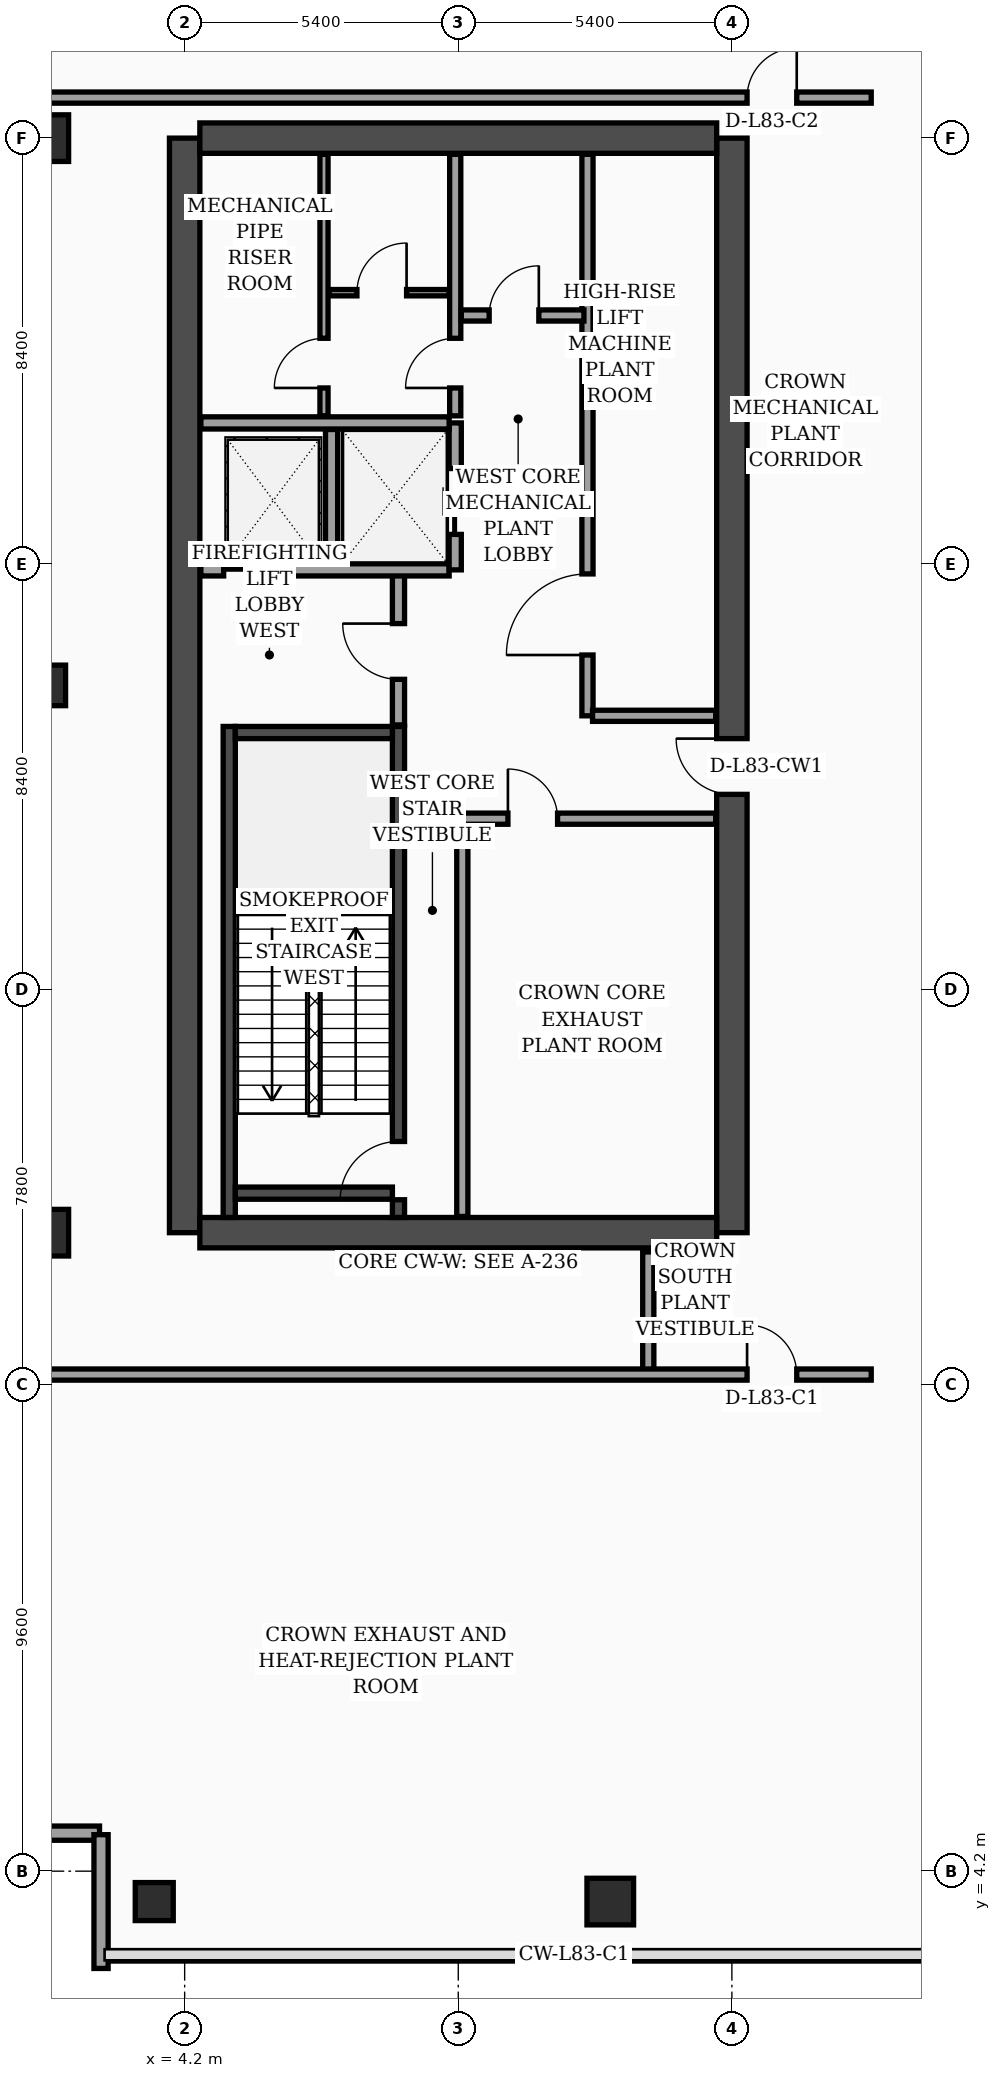
"""IFC4 building model, lengths in metres.
Left out: names, types, materials, properties, quantities, classifications, styles, units other than length and angle.
Written with IfcOpenShell. Run it as: python <this file> out.ifc"""

import sys

from ifc_helpers import new_model, si_unit, direction, frame, frame_2d, origin, origin_2d, place, context, subcontext, project, spatial, rectangle, hollow_rectangle, extrude, element, fill, save


model = new_model("IFC4")
c1 = context("Model", 3, precision=1e-05, world=origin(), true_north=direction((0.0, 1.0)))
c2 = subcontext(c1, "Body", "Model", "MODEL_VIEW")
j1 = project(units=[si_unit("LENGTHUNIT", "METRE"), si_unit("PLANEANGLEUNIT", "RADIAN")], contexts=[c1])
p1 = place(None, origin())
s1 = spatial("IfcSite", under=j1, at=p1, CompositionType="ELEMENT")
p2 = place(p1, origin())
s2 = spatial("IfcBuilding", under=s1, at=p2, CompositionType="ELEMENT")
p3 = place(p2, frame((0.0, 0.0, 340.5)))
s3 = spatial("IfcBuildingStorey", under=s2, at=p3, CompositionType="ELEMENT", Elevation=340.5)
p4 = place(p3, frame((4.2, 16.8, 0.0), z_axis=(0.0, 0.0, 1.0), x_axis=(0.0, 1.0, 0.0)))
e1 = element("IfcWall", 1, at=p4, inside=s3, PredefinedType="SHEAR", context=c2, shape_type="SweptSolid", body=[
    extrude(rectangle(XDim=21.6, YDim=0.6, at=frame_2d((10.8, 0.0))), origin(), (0.0, 0.0, 1.0), 4.76),
])
p5 = place(p3, frame((15.0, 16.8, 0.0), z_axis=(0.0, 0.0, 1.0), x_axis=(0.0, 1.0, 0.0)))
e2 = element("IfcWall", 2, at=p5, inside=s3, PredefinedType="SHEAR", context=c2, shape_type="SweptSolid", body=[
    extrude(rectangle(XDim=21.6, YDim=0.6, at=frame_2d((10.8, 0.0))), origin(), (0.0, 0.0, 1.0), 4.76),
])
p6 = place(p5, frame((8.65, 0.0, 0.0)))
e3 = element("IfcOpeningElement", 3, at=p6, cuts=e2, PredefinedType="OPENING", context=c2, shape_type="SweptSolid", body=[
    extrude(rectangle(XDim=1.1, YDim=2.2, at=frame_2d((0.55, 1.1))), frame((0.0, 0.31, 0.0), z_axis=(0.0, -1.0, 0.0), x_axis=(1.0, 0.0, 0.0)), (0.0, 0.0, 1.0), 0.62),
])
for number, where, z_axis, x_axis in (
    (4, (4.5, 38.4, 0.0), (0.0, 0.0, 1.0), (1.0, 0.0, 0.0)),
    (5, (4.5, 16.8, 0.0), (0.0, 0.0, 1.0), (1.0, 0.0, 0.0)),
):
    element("IfcWall", number, at=place(p3, frame(where, z_axis=z_axis, x_axis=x_axis)), inside=s3, PredefinedType="SHEAR", context=c2, shape_type="SweptSolid", body=[
        extrude(rectangle(XDim=10.2, YDim=0.6, at=frame_2d((5.1, 0.0))), origin(), (0.0, 0.0, 1.0), 4.76),
    ])
p7 = place(p3, frame((5.08, 17.1, 0.0), z_axis=(0.0, 0.0, 1.0), x_axis=(0.0, 1.0, 0.0)))
e6 = element("IfcWall", 6, at=p7, inside=s3, PredefinedType="SOLIDWALL", context=c2, shape_type="SweptSolid", body=[
    extrude(rectangle(XDim=9.69, YDim=0.24, at=frame_2d((4.845, 0.0))), origin(), (0.0, 0.0, 1.0), 4.76),
])
p8 = place(p3, frame((8.42, 17.1, 0.0), z_axis=(0.0, 0.0, 1.0), x_axis=(0.0, 1.0, 0.0)))
e7 = element("IfcWall", 7, at=p8, inside=s3, PredefinedType="SOLIDWALL", context=c2, shape_type="SweptSolid", body=[
    extrude(rectangle(XDim=9.69, YDim=0.24, at=frame_2d((4.845, 0.0))), origin(), (0.0, 0.0, 1.0), 4.76),
])
p9 = place(p8, frame((0.35, 0.0, 0.0)))
e8 = element("IfcOpeningElement", 8, at=p9, cuts=e7, PredefinedType="OPENING", context=c2, shape_type="SweptSolid", body=[
    extrude(rectangle(XDim=1.15, YDim=2.2, at=frame_2d((0.575, 1.1))), frame((0.0, 0.13, 0.0), z_axis=(0.0, -1.0, 0.0), x_axis=(1.0, 0.0, 0.0)), (0.0, 0.0, 1.0), 0.26),
])
for number, where, z_axis, x_axis in (
    (9, (5.2, 17.58, 0.0), (0.0, 0.0, 1.0), (1.0, 0.0, 0.0)),
    (10, (5.2, 26.67, 0.0), (0.0, 0.0, 1.0), (1.0, 0.0, 0.0)),
):
    element("IfcWall", number, at=place(p3, frame(where, z_axis=z_axis, x_axis=x_axis)), inside=s3, PredefinedType="SOLIDWALL", context=c2, shape_type="SweptSolid", body=[
        extrude(rectangle(XDim=3.1, YDim=0.24, at=frame_2d((1.55, 0.0))), origin(), (0.0, 0.0, 1.0), 4.76),
    ])
p10 = place(p3, frame((3.6, 3.6, 0.0), z_axis=(0.0, 0.0, 1.0), x_axis=(1.0, 0.0, 0.0)))
e11 = element("IfcColumn", 11, at=p10, inside=s3, PredefinedType="COLUMN", context=c2, shape_type="SweptSolid", body=[
    extrude(hollow_rectangle(XDim=0.75, YDim=0.75, WallThickness=0.032, at=origin_2d()), origin(), (0.0, 0.0, 1.0), 4.76),
])
p11 = place(p3, frame((1.45, 16.8, 0.0), z_axis=(0.0, 0.0, 1.0), x_axis=(1.0, 0.0, 0.0)))
e12 = element("IfcColumn", 12, at=p11, inside=s3, PredefinedType="COLUMN", context=c2, shape_type="SweptSolid", body=[
    extrude(rectangle(XDim=0.92, YDim=0.92, at=origin_2d()), origin(), (0.0, 0.0, 1.0), 4.76),
])
p12 = place(p3, frame((1.45, 27.6, 0.0), z_axis=(0.0, 0.0, 1.0), x_axis=(1.0, 0.0, 0.0)))
e13 = element("IfcColumn", 13, at=p12, inside=s3, PredefinedType="COLUMN", context=c2, shape_type="SweptSolid", body=[
    extrude(rectangle(XDim=0.8, YDim=0.8, at=origin_2d()), origin(), (0.0, 0.0, 1.0), 4.76),
])
for number, where, z_axis, x_axis in (
    (14, (1.45, 38.4, 0.0), (0.0, 0.0, 1.0), (1.0, 0.0, 0.0)),
    (15, (12.6, 3.6, 0.0), (0.0, 0.0, 1.0), (1.0, 0.0, 0.0)),
):
    element("IfcColumn", number, at=place(p3, frame(where, z_axis=z_axis, x_axis=x_axis)), inside=s3, PredefinedType="COLUMN", context=c2, shape_type="SweptSolid", body=[
        extrude(rectangle(XDim=0.92, YDim=0.92, at=origin_2d()), origin(), (0.0, 0.0, 1.0), 4.76),
    ])
p13 = place(p3, frame((-0.12, 4.95, 0.0), z_axis=(0.0, 0.0, 1.0), x_axis=(1.0, 0.0, 0.0)))
e16 = element("IfcWall", 16, at=p13, inside=s3, PredefinedType="SOLIDWALL", context=c2, shape_type="SweptSolid", body=[
    extrude(rectangle(XDim=2.64, YDim=0.28, at=frame_2d((1.32, 0.0))), origin(), (0.0, 0.0, 1.0), 4.76),
])
p14 = place(p3, frame((2.55, 4.92, 0.0), z_axis=(0.0, 0.0, 1.0), x_axis=(0.0, -1.0, 0.0)))
e17 = element("IfcWall", 17, at=p14, inside=s3, PredefinedType="SOLIDWALL", context=c2, shape_type="SweptSolid", body=[
    extrude(rectangle(XDim=2.64, YDim=0.28, at=frame_2d((1.32, 0.0))), origin(), (0.0, 0.0, 1.0), 4.76),
])
p15 = place(p3, frame((8.42, 26.82, 0.0), z_axis=(0.0, 0.0, 1.0), x_axis=(0.0, 1.0, 0.0)))
e18 = element("IfcWall", 18, at=p15, inside=s3, PredefinedType="SOLIDWALL", context=c2, shape_type="SweptSolid", body=[
    extrude(rectangle(XDim=3.0, YDim=0.24, at=frame_2d((1.5, 0.0))), origin(), (0.0, 0.0, 1.0), 4.76),
])
p16 = place(p15, frame((0.9, 0.0, 0.0)))
e19 = element("IfcOpeningElement", 19, at=p16, cuts=e18, PredefinedType="OPENING", context=c2, shape_type="SweptSolid", body=[
    extrude(rectangle(XDim=1.1, YDim=2.2, at=frame_2d((0.55, 1.1))), frame((0.0, 0.13, 0.0), z_axis=(0.0, -1.0, 0.0), x_axis=(1.0, 0.0, 0.0)), (0.0, 0.0, 1.0), 0.26),
])
p17 = place(p3, frame((4.52, 29.88, 0.0), z_axis=(0.0, 0.0, 1.0), x_axis=(1.0, 0.0, 0.0)))
e20 = element("IfcWall", 20, at=p17, inside=s3, PredefinedType="SOLIDWALL", context=c2, shape_type="SweptSolid", body=[
    extrude(rectangle(XDim=4.9, YDim=0.24, at=frame_2d((2.45, 0.0))), origin(), (0.0, 0.0, 1.0), 4.76),
])
p18 = place(p17, frame((0.45, 0.0, 0.0)))
e21 = element("IfcOpeningElement", 21, at=p18, cuts=e20, PredefinedType="OPENING", context=c2, shape_type="SweptSolid", body=[
    extrude(rectangle(XDim=1.3, YDim=2.35, at=frame_2d((0.65, 1.175))), frame((0.0, 0.13, 0.0), z_axis=(0.0, -1.0, 0.0), x_axis=(1.0, 0.0, 0.0)), (0.0, 0.0, 1.0), 0.26),
])
p19 = place(p3, frame((7.1, 30.02, 0.0), z_axis=(0.0, 0.0, 1.0), x_axis=(0.0, 1.0, 0.0)))
e22 = element("IfcWall", 22, at=p19, inside=s3, PredefinedType="SOLIDWALL", context=c2, shape_type="SweptSolid", body=[
    extrude(rectangle(XDim=2.63, YDim=0.24, at=frame_2d((1.315, 0.0))), origin(), (0.0, 0.0, 1.0), 4.76),
])
p20 = place(p3, frame((9.54, 29.88, 0.0), z_axis=(0.0, 0.0, 1.0), x_axis=(0.0, 1.0, 0.0)))
e23 = element("IfcWall", 23, at=p20, inside=s3, PredefinedType="SOLIDWALL", context=c2, shape_type="SweptSolid", body=[
    extrude(rectangle(XDim=2.9, YDim=0.24, at=frame_2d((1.45, 0.0))), origin(), (0.0, 0.0, 1.0), 4.76),
])
p21 = place(p20, frame((0.7, 0.0, 0.0)))
e24 = element("IfcOpeningElement", 24, at=p21, cuts=e23, PredefinedType="OPENING", context=c2, shape_type="SweptSolid", body=[
    extrude(rectangle(XDim=1.3, YDim=2.35, at=frame_2d((0.65, 1.175))), frame((0.0, 0.13, 0.0), z_axis=(0.0, -1.0, 0.0), x_axis=(1.0, 0.0, 0.0)), (0.0, 0.0, 1.0), 0.26),
])
p22 = place(p3, frame((4.52, 32.78, 0.0), z_axis=(0.0, 0.0, 1.0), x_axis=(1.0, 0.0, 0.0)))
e25 = element("IfcWall", 25, at=p22, inside=s3, PredefinedType="SOLIDWALL", context=c2, shape_type="SweptSolid", body=[
    extrude(rectangle(XDim=4.9, YDim=0.24, at=frame_2d((2.45, 0.0))), origin(), (0.0, 0.0, 1.0), 4.76),
])
p23 = place(p3, frame((9.68, 17.12, 0.0), z_axis=(0.0, 0.0, 1.0), x_axis=(0.0, 1.0, 0.0)))
e26 = element("IfcWall", 26, at=p23, inside=s3, PredefinedType="SOLIDWALL", context=c2, shape_type="SweptSolid", body=[
    extrude(rectangle(XDim=7.88, YDim=0.22, at=frame_2d((3.94, 0.0))), origin(), (0.0, 0.0, 1.0), 4.76),
])
p24 = place(p3, frame((6.95, 32.92, 0.0), z_axis=(0.0, 0.0, 1.0), x_axis=(0.0, 1.0, 0.0)))
e27 = element("IfcWall", 27, at=p24, inside=s3, PredefinedType="PARTITIONING", context=c2, shape_type="SweptSolid", body=[
    extrude(rectangle(XDim=5.16, YDim=0.16, at=frame_2d((2.58, 0.0))), origin(), (0.0, 0.0, 1.0), 4.76),
])
p25 = place(p24, frame((0.55, 0.0, 0.0)))
e28 = element("IfcOpeningElement", 28, at=p25, cuts=e27, PredefinedType="OPENING", context=c2, shape_type="SweptSolid", body=[
    extrude(rectangle(XDim=0.98, YDim=2.15, at=frame_2d((0.49, 1.075))), frame((0.0, 0.09, 0.0), z_axis=(0.0, -1.0, 0.0), x_axis=(1.0, 0.0, 0.0)), (0.0, 0.0, 1.0), 0.18),
])
p26 = place(p3, frame((7.05, 35.35, 0.0), z_axis=(0.0, 0.0, 1.0), x_axis=(1.0, 0.0, 0.0)))
e29 = element("IfcWall", 29, at=p26, inside=s3, PredefinedType="PARTITIONING", context=c2, shape_type="SweptSolid", body=[
    extrude(rectangle(XDim=2.37, YDim=0.125, at=frame_2d((1.185, 0.0))), origin(), (0.0, 0.0, 1.0), 4.76),
])
p27 = place(p26, frame((0.55, 0.0, 0.0)))
e30 = element("IfcOpeningElement", 30, at=p27, cuts=e29, PredefinedType="OPENING", context=c2, shape_type="SweptSolid", body=[
    extrude(rectangle(XDim=0.98, YDim=2.15, at=frame_2d((0.49, 1.075))), frame((0.0, 0.073, 0.0), z_axis=(0.0, -1.0, 0.0), x_axis=(1.0, 0.0, 0.0)), (0.0, 0.0, 1.0), 0.145),
])
p28 = place(p3, frame((9.54, 32.92, 0.0), z_axis=(0.0, 0.0, 1.0), x_axis=(0.0, 1.0, 0.0)))
e31 = element("IfcWall", 31, at=p28, inside=s3, PredefinedType="SOLIDWALL", context=c2, shape_type="SweptSolid", body=[
    extrude(rectangle(XDim=5.16, YDim=0.22, at=frame_2d((2.58, 0.0))), origin(), (0.0, 0.0, 1.0), 4.76),
])
p29 = place(p28, frame((0.55, 0.0, 0.0)))
e32 = element("IfcOpeningElement", 32, at=p29, cuts=e31, PredefinedType="OPENING", context=c2, shape_type="SweptSolid", body=[
    extrude(rectangle(XDim=0.98, YDim=2.15, at=frame_2d((0.49, 1.075))), frame((0.0, 0.12, 0.0), z_axis=(0.0, -1.0, 0.0), x_axis=(1.0, 0.0, 0.0)), (0.0, 0.0, 1.0), 0.24),
])
p30 = place(p3, frame((9.68, 24.97, 0.0), z_axis=(0.0, 0.0, 1.0), x_axis=(1.0, 0.0, 0.0)))
e33 = element("IfcWall", 33, at=p30, inside=s3, PredefinedType="SOLIDWALL", context=c2, shape_type="SweptSolid", body=[
    extrude(rectangle(XDim=5.0, YDim=0.22, at=frame_2d((2.5, 0.0))), origin(), (0.0, 0.0, 1.0), 4.76),
])
p31 = place(p30, frame((0.9, 0.0, 0.0)))
e34 = element("IfcOpeningElement", 34, at=p31, cuts=e33, PredefinedType="OPENING", context=c2, shape_type="SweptSolid", body=[
    extrude(rectangle(XDim=0.98, YDim=2.15, at=frame_2d((0.49, 1.075))), frame((0.0, 0.12, 0.0), z_axis=(0.0, -1.0, 0.0), x_axis=(1.0, 0.0, 0.0)), (0.0, 0.0, 1.0), 0.24),
])
p32 = place(p3, frame((12.15, 27.0, 0.0), z_axis=(0.0, 0.0, 1.0), x_axis=(0.0, 1.0, 0.0)))
e35 = element("IfcWall", 35, at=p32, inside=s3, PredefinedType="SOLIDWALL", context=c2, shape_type="SweptSolid", body=[
    extrude(rectangle(XDim=11.08, YDim=0.22, at=frame_2d((5.54, 0.0))), origin(), (0.0, 0.0, 1.0), 4.76),
])
p33 = place(p32, frame((1.2, 0.0, 0.0)))
e36 = element("IfcOpeningElement", 36, at=p33, cuts=e35, PredefinedType="OPENING", context=c2, shape_type="SweptSolid", body=[
    extrude(rectangle(XDim=1.6, YDim=2.35, at=frame_2d((0.8, 1.175))), frame((0.0, 0.12, 0.0), z_axis=(0.0, -1.0, 0.0), x_axis=(1.0, 0.0, 0.0)), (0.0, 0.0, 1.0), 0.24),
])
p34 = place(p3, frame((12.25, 27.0, 0.0), z_axis=(0.0, 0.0, 1.0), x_axis=(1.0, 0.0, 0.0)))
e37 = element("IfcWall", 37, at=p34, inside=s3, PredefinedType="SOLIDWALL", context=c2, shape_type="SweptSolid", body=[
    extrude(rectangle(XDim=2.43, YDim=0.22, at=frame_2d((1.215, 0.0))), origin(), (0.0, 0.0, 1.0), 4.76),
])
p35 = place(p3, frame((9.66, 34.9, 0.0), z_axis=(0.0, 0.0, 1.0), x_axis=(1.0, 0.0, 0.0)))
e38 = element("IfcWall", 38, at=p35, inside=s3, PredefinedType="SOLIDWALL", context=c2, shape_type="SweptSolid", body=[
    extrude(rectangle(XDim=2.42, YDim=0.22, at=frame_2d((1.21, 0.0))), origin(), (0.0, 0.0, 1.0), 4.76),
])
p36 = place(p35, frame((0.55, 0.0, 0.0)))
e39 = element("IfcOpeningElement", 39, at=p36, cuts=e38, PredefinedType="OPENING", context=c2, shape_type="SweptSolid", body=[
    extrude(rectangle(XDim=0.98, YDim=2.15, at=frame_2d((0.49, 1.075))), frame((0.0, 0.12, 0.0), z_axis=(0.0, -1.0, 0.0), x_axis=(1.0, 0.0, 0.0)), (0.0, 0.0, 1.0), 0.24),
])
p37 = place(p3, frame((13.35, 14.0, 0.0), z_axis=(0.0, 0.0, 1.0), x_axis=(0.0, 1.0, 0.0)))
e40 = element("IfcWall", 40, at=p37, inside=s3, PredefinedType="SOLIDWALL", context=c2, shape_type="SweptSolid", body=[
    extrude(rectangle(XDim=2.42, YDim=0.22, at=frame_2d((1.21, 0.0))), origin(), (0.0, 0.0, 1.0), 4.76),
])
p38 = place(p3, frame((0.08, 14.0, 0.0), z_axis=(0.0, 0.0, 1.0), x_axis=(1.0, 0.0, 0.0)))
e41 = element("IfcWall", 41, at=p38, inside=s3, PredefinedType="SOLIDWALL", context=c2, shape_type="SweptSolid", body=[
    extrude(rectangle(XDim=17.67, YDim=0.22, at=frame_2d((8.835, 0.0))), origin(), (0.0, 0.0, 1.0), 4.19),
])
p39 = place(p38, frame((15.22, 0.0, 0.0)))
e42 = element("IfcOpeningElement", 42, at=p39, cuts=e41, PredefinedType="OPENING", context=c2, shape_type="SweptSolid", body=[
    extrude(rectangle(XDim=0.98, YDim=2.15, at=frame_2d((0.49, 1.075))), frame((0.0, 0.12, 0.0), z_axis=(0.0, -1.0, 0.0), x_axis=(1.0, 0.0, 0.0)), (0.0, 0.0, 1.0), 0.24),
])
p40 = place(p3, frame((0.08, 39.2, 0.0), z_axis=(0.0, 0.0, 1.0), x_axis=(1.0, 0.0, 0.0)))
e43 = element("IfcWall", 43, at=p40, inside=s3, PredefinedType="SOLIDWALL", context=c2, shape_type="SweptSolid", body=[
    extrude(rectangle(XDim=17.67, YDim=0.22, at=frame_2d((8.835, 0.0))), origin(), (0.0, 0.0, 1.0), 4.19),
])
p41 = place(p40, frame((15.22, 0.0, 0.0)))
e44 = element("IfcOpeningElement", 44, at=p41, cuts=e43, PredefinedType="OPENING", context=c2, shape_type="SweptSolid", body=[
    extrude(rectangle(XDim=0.98, YDim=2.15, at=frame_2d((0.49, 1.075))), frame((0.0, 0.12, 0.0), z_axis=(0.0, -1.0, 0.0), x_axis=(1.0, 0.0, 0.0)), (0.0, 0.0, 1.0), 0.24),
])
p42 = place(p16, origin())
e45 = element("IfcDoor", 45, at=p42, inside=s3, OperationType="SINGLE_SWING_RIGHT", PredefinedType="DOOR", context=c2, shape_type="SweptSolid", body=[
    extrude(rectangle(XDim=1.1, YDim=2.2, at=frame_2d((0.55, 1.1))), frame((0.0, 0.025, 0.0), z_axis=(0.0, -1.0, 0.0), x_axis=(1.0, 0.0, 0.0)), (0.0, 0.0, 1.0), 0.05),
])
fill(e19, e45)
p43 = place(p18, origin())
e46 = element("IfcDoor", 46, at=p43, inside=s3, OperationType="DOUBLE_DOOR_SLIDING", PredefinedType="DOOR", context=c2, shape_type="SweptSolid", body=[
    extrude(rectangle(XDim=1.3, YDim=2.35, at=frame_2d((0.65, 1.175))), frame((0.0, 0.025, 0.0), z_axis=(0.0, -1.0, 0.0), x_axis=(1.0, 0.0, 0.0)), (0.0, 0.0, 1.0), 0.05),
])
fill(e21, e46)
p44 = place(p21, origin())
e47 = element("IfcDoor", 47, at=p44, inside=s3, OperationType="DOUBLE_DOOR_SLIDING", PredefinedType="DOOR", context=c2, shape_type="SweptSolid", body=[
    extrude(rectangle(XDim=1.3, YDim=2.35, at=frame_2d((0.65, 1.175))), frame((0.0, 0.025, 0.0), z_axis=(0.0, -1.0, 0.0), x_axis=(1.0, 0.0, 0.0)), (0.0, 0.0, 1.0), 0.05),
])
fill(e24, e47)
p45 = place(p25, origin())
e48 = element("IfcDoor", 48, at=p45, inside=s3, OperationType="SINGLE_SWING_LEFT", PredefinedType="DOOR", context=c2, shape_type="SweptSolid", body=[
    extrude(rectangle(XDim=0.98, YDim=2.15, at=frame_2d((0.49, 1.075))), frame((0.0, 0.025, 0.0), z_axis=(0.0, -1.0, 0.0), x_axis=(1.0, 0.0, 0.0)), (0.0, 0.0, 1.0), 0.05),
])
fill(e28, e48)
p46 = place(p27, origin())
e49 = element("IfcDoor", 49, at=p46, inside=s3, OperationType="SINGLE_SWING_RIGHT", PredefinedType="DOOR", context=c2, shape_type="SweptSolid", body=[
    extrude(rectangle(XDim=0.98, YDim=2.15, at=frame_2d((0.49, 1.075))), frame((0.0, 0.025, 0.0), z_axis=(0.0, -1.0, 0.0), x_axis=(1.0, 0.0, 0.0)), (0.0, 0.0, 1.0), 0.05),
])
fill(e30, e49)
p47 = place(p29, origin())
e50 = element("IfcDoor", 50, at=p47, inside=s3, OperationType="SINGLE_SWING_LEFT", PredefinedType="DOOR", context=c2, shape_type="SweptSolid", body=[
    extrude(rectangle(XDim=0.98, YDim=2.15, at=frame_2d((0.49, 1.075))), frame((0.0, 0.025, 0.0), z_axis=(0.0, -1.0, 0.0), x_axis=(1.0, 0.0, 0.0)), (0.0, 0.0, 1.0), 0.05),
])
fill(e32, e50)
p48 = place(p31, origin())
e51 = element("IfcDoor", 51, at=p48, inside=s3, OperationType="SINGLE_SWING_LEFT", PredefinedType="DOOR", context=c2, shape_type="SweptSolid", body=[
    extrude(rectangle(XDim=0.98, YDim=2.15, at=frame_2d((0.49, 1.075))), frame((0.0, 0.025, 0.0), z_axis=(0.0, -1.0, 0.0), x_axis=(1.0, 0.0, 0.0)), (0.0, 0.0, 1.0), 0.05),
])
fill(e34, e51)
p49 = place(p33, origin())
e52 = element("IfcDoor", 52, at=p49, inside=s3, OperationType="SINGLE_SWING_LEFT", PredefinedType="DOOR", context=c2, shape_type="SweptSolid", body=[
    extrude(rectangle(XDim=1.6, YDim=2.35, at=frame_2d((0.8, 1.175))), frame((0.0, 0.025, 0.0), z_axis=(0.0, -1.0, 0.0), x_axis=(1.0, 0.0, 0.0)), (0.0, 0.0, 1.0), 0.05),
])
fill(e36, e52)
p50 = place(p36, origin())
e53 = element("IfcDoor", 53, at=p50, inside=s3, OperationType="SINGLE_SWING_RIGHT", PredefinedType="DOOR", context=c2, shape_type="SweptSolid", body=[
    extrude(rectangle(XDim=0.98, YDim=2.15, at=frame_2d((0.49, 1.075))), frame((0.0, 0.025, 0.0), z_axis=(0.0, -1.0, 0.0), x_axis=(1.0, 0.0, 0.0)), (0.0, 0.0, 1.0), 0.05),
])
fill(e39, e53)
p51 = place(p39, origin())
e54 = element("IfcDoor", 54, at=p51, inside=s3, OperationType="SINGLE_SWING_LEFT", PredefinedType="DOOR", context=c2, shape_type="SweptSolid", body=[
    extrude(rectangle(XDim=0.98, YDim=2.15, at=frame_2d((0.49, 1.075))), frame((0.0, 0.025, 0.0), z_axis=(0.0, -1.0, 0.0), x_axis=(1.0, 0.0, 0.0)), (0.0, 0.0, 1.0), 0.05),
])
fill(e42, e54)
p52 = place(p41, origin())
e55 = element("IfcDoor", 55, at=p52, inside=s3, OperationType="SINGLE_SWING_RIGHT", PredefinedType="DOOR", context=c2, shape_type="SweptSolid", body=[
    extrude(rectangle(XDim=0.98, YDim=2.15, at=frame_2d((0.49, 1.075))), frame((0.0, 0.025, 0.0), z_axis=(0.0, -1.0, 0.0), x_axis=(1.0, 0.0, 0.0)), (0.0, 0.0, 1.0), 0.05),
])
fill(e44, e55)
p53 = place(p9, origin())
e56 = element("IfcDoor", 56, at=p53, inside=s3, OperationType="SINGLE_SWING_LEFT", PredefinedType="DOOR", context=c2, shape_type="SweptSolid", body=[
    extrude(rectangle(XDim=1.15, YDim=2.2, at=frame_2d((0.575, 1.1))), frame((0.0, 0.025, 0.0), z_axis=(0.0, -1.0, 0.0), x_axis=(1.0, 0.0, 0.0)), (0.0, 0.0, 1.0), 0.05),
])
fill(e8, e56)
p54 = place(p6, origin())
e57 = element("IfcDoor", 57, at=p54, inside=s3, OperationType="SINGLE_SWING_RIGHT", PredefinedType="DOOR", context=c2, shape_type="SweptSolid", body=[
    extrude(rectangle(XDim=1.1, YDim=2.2, at=frame_2d((0.55, 1.1))), frame((0.0, 0.025, 0.0), z_axis=(0.0, -1.0, 0.0), x_axis=(1.0, 0.0, 0.0)), (0.0, 0.0, 1.0), 0.05),
])
fill(e3, e57)
save(model, sys.argv[1])
